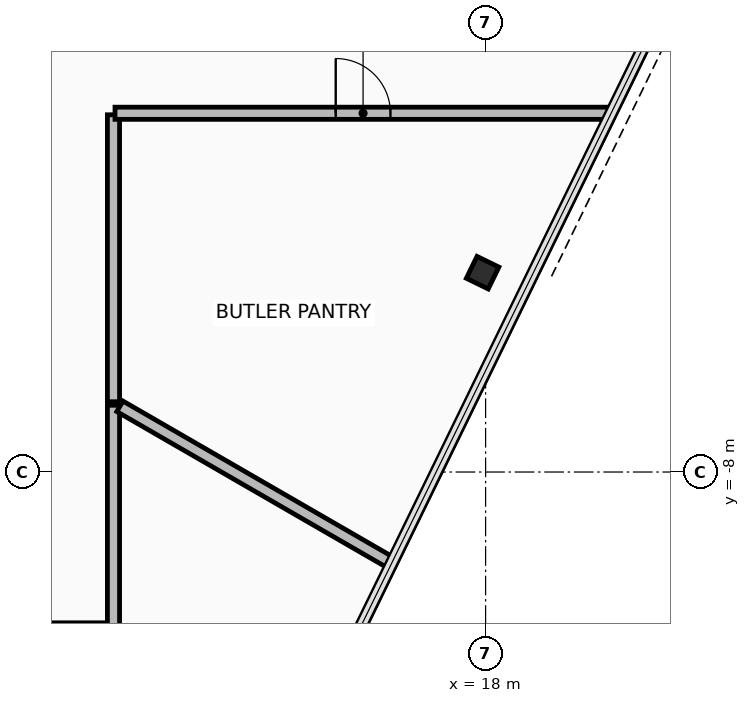
"""IFC4 building model, lengths in metres.
Left out: names, types, materials, properties, quantities, classifications, styles, units other than length and angle.
Written with IfcOpenShell. Run it as: python <this file> out.ifc"""

import sys

from ifc_helpers import new_model, si_unit, direction, frame, frame_2d, origin, origin_2d, place, context, subcontext, project, spatial, rectangle, hollow_rectangle, extrude, element, fill, save


model = new_model("IFC4")
c1 = context("Model", 3, precision=1e-05, world=origin(), true_north=direction((0.0, 1.0)))
c2 = subcontext(c1, "Body", "Model", "MODEL_VIEW")
j1 = project(units=[si_unit("LENGTHUNIT", "METRE"), si_unit("PLANEANGLEUNIT", "RADIAN")], contexts=[c1])
p1 = place(None, origin())
s1 = spatial("IfcSite", under=j1, at=p1, CompositionType="ELEMENT")
p2 = place(p1, origin())
s2 = spatial("IfcBuilding", under=s1, at=p2, CompositionType="ELEMENT")
p3 = place(p2, frame((0.0, 0.0, 253.4)))
s3 = spatial("IfcBuildingStorey", under=s2, at=p3, CompositionType="ELEMENT", Elevation=253.4)
p4 = place(p3, frame((17.951, -4.722, 0.0), z_axis=(0.0, 0.0, 1.0), x_axis=(0.43837271548, 0.898793281196, 0.0)))
e1 = element("IfcColumn", 1, at=p4, inside=s3, PredefinedType="COLUMN", context=c2, shape_type="SweptSolid", body=[
    extrude(hollow_rectangle(XDim=0.4, YDim=0.4, WallThickness=0.025, at=origin_2d()), origin(), (0.0, 0.0, 1.0), 3.6),
])
p5 = place(p3, frame((4.825, -10.58, 0.0), z_axis=(0.0, 0.0, 1.0), x_axis=(1.0, 0.0, 0.0)))
e2 = element("IfcWall", 2, at=p5, inside=s3, PredefinedType="PARTITIONING", context=c2, shape_type="SweptSolid", body=[
    extrude(rectangle(XDim=7.054, YDim=0.2, at=frame_2d((3.527, 0.0))), origin(), (0.0, 0.0, 1.0), 2.915),
])
p6 = place(p5, frame((2.927, 0.0, 0.0)))
e3 = element("IfcOpeningElement", 3, at=p6, cuts=e2, PredefinedType="OPENING", context=c2, shape_type="SweptSolid", body=[
    extrude(rectangle(XDim=1.2, YDim=2.15, at=frame_2d((0.6, 1.075))), frame((0.0, 0.11, 0.0), z_axis=(0.0, -1.0, 0.0), x_axis=(1.0, 0.0, 0.0)), (0.0, 0.0, 1.0), 0.22),
])
p7 = place(p3, frame((11.88, -10.579, 0.0), z_axis=(0.0, 0.0, 1.0), x_axis=(0.0, 1.0, 0.0)))
e4 = element("IfcWall", 4, at=p7, inside=s3, PredefinedType="PARTITIONING", context=c2, shape_type="SweptSolid", body=[
    extrude(rectangle(XDim=3.677, YDim=0.2, at=frame_2d((1.839, 0.0))), origin(), (0.0, 0.0, 1.0), 3.115),
])
p8 = place(p3, frame((11.985, -6.92, 0.0), z_axis=(0.0, 0.0, 1.0), x_axis=(0.866041575714, -0.49997198835, 0.0)))
e5 = element("IfcWall", 5, at=p8, inside=s3, PredefinedType="PARTITIONING", context=c2, shape_type="SweptSolid", body=[
    extrude(rectangle(XDim=5.138, YDim=0.2, at=frame_2d((2.569, 0.0))), origin(), (0.0, 0.0, 1.0), 2.765),
])
p9 = place(p3, frame((11.88, -6.844, 0.0), z_axis=(0.0, 0.0, 1.0), x_axis=(0.0, 1.0, 0.0)))
e6 = element("IfcWall", 6, at=p9, inside=s3, PredefinedType="PARTITIONING", context=c2, shape_type="SweptSolid", body=[
    extrude(rectangle(XDim=4.719, YDim=0.2, at=frame_2d((2.36, 0.0))), origin(), (0.0, 0.0, 1.0), 2.915),
])
p10 = place(p3, frame((11.905, -2.1, 0.0), z_axis=(0.0, 0.0, 1.0), x_axis=(1.0, 0.0, 0.0)))
e7 = element("IfcWall", 7, at=p10, inside=s3, PredefinedType="PARTITIONING", context=c2, shape_type="SweptSolid", body=[
    extrude(rectangle(XDim=8.159, YDim=0.2, at=frame_2d((4.08, 0.0))), origin(), (0.0, 0.0, 1.0), 2.765),
])
p11 = place(p10, frame((3.63, 0.0, 0.0)))
e8 = element("IfcOpeningElement", 8, at=p11, cuts=e7, PredefinedType="OPENING", context=c2, shape_type="SweptSolid", body=[
    extrude(rectangle(XDim=0.9, YDim=2.1, at=frame_2d((0.45, 1.05))), frame((0.0, 0.11, 0.0), z_axis=(0.0, -1.0, 0.0), x_axis=(1.0, 0.0, 0.0)), (0.0, 0.0, 1.0), 0.22),
])
p12 = place(p11, origin())
e9 = element("IfcDoor", 9, at=p12, inside=s3, OperationType="SINGLE_SWING_LEFT", PredefinedType="DOOR", context=c2, shape_type="SweptSolid", body=[
    extrude(rectangle(XDim=0.9, YDim=2.1, at=frame_2d((0.45, 1.05))), frame((0.0, 0.025, 0.0), z_axis=(0.0, -1.0, 0.0), x_axis=(1.0, 0.0, 0.0)), (0.0, 0.0, 1.0), 0.05),
])
fill(e8, e9)
save(model, sys.argv[1])
